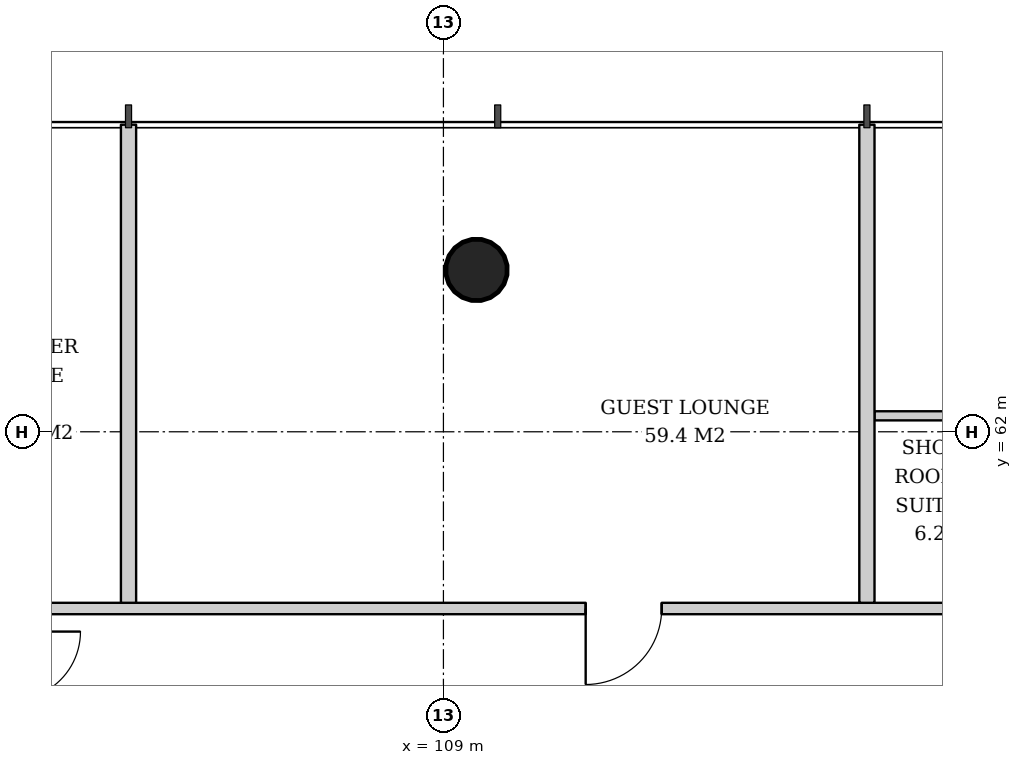
"""IFC4 building model, lengths in metres.
Left out: names, types, materials, properties, quantities, classifications, styles, units other than length and angle.
Written with IfcOpenShell. Run it as: python <this file> out.ifc"""

import sys

from ifc_helpers import new_model, si_unit, direction, frame, frame_2d, origin, origin_2d, place, context, subcontext, project, spatial, rectangle, hollow_circle, extrude, element, fill, save


model = new_model("IFC4")
c1 = context("Model", 3, precision=1e-05, world=origin(), true_north=direction((0.0, 1.0)))
c2 = subcontext(c1, "Body", "Model", "MODEL_VIEW")
j1 = project(units=[si_unit("LENGTHUNIT", "METRE"), si_unit("PLANEANGLEUNIT", "RADIAN")], contexts=[c1])
p1 = place(None, origin())
s1 = spatial("IfcSite", under=j1, at=p1, CompositionType="ELEMENT")
p2 = place(p1, origin())
s2 = spatial("IfcBuilding", under=s1, at=p2, CompositionType="ELEMENT")
p3 = place(p2, frame((0.0, 0.0, 40.0)))
s3 = spatial("IfcBuildingStorey", under=s2, at=p3, CompositionType="ELEMENT", Elevation=40.0)
p4 = place(p3, frame((109.409, 64.181, 0.0), z_axis=(0.021561848751, -0.043059525333, 0.998839808957), x_axis=(0.894160516368, 0.44774654769, 0.0)))
e1 = element("IfcColumn", 1, at=p4, inside=s3, PredefinedType="COLUMN", context=c2, shape_type="SweptSolid", body=[
    extrude(hollow_circle(Radius=0.406, WallThickness=0.03, at=origin_2d()), origin(), (0.0, 0.0, 1.0), 3.804),
])
p5 = place(p3, frame((117.091, 62.21, 0.0), z_axis=(0.0, 0.0, 1.0), x_axis=(-1.0, 0.0, 0.0)))
e2 = element("IfcWall", 2, at=p5, inside=s3, PredefinedType="PARTITIONING", context=c2, shape_type="SweptSolid", body=[
    extrude(rectangle(XDim=2.42, YDim=0.12, at=frame_2d((1.21, 0.0))), origin(), (0.0, 0.0, 1.0), 2.847),
])
p6 = place(p3, frame((131.294, 59.675, 0.0), z_axis=(0.0, 0.0, 1.0), x_axis=(-1.0, 0.0, 0.0)))
e3 = element("IfcWall", 3, at=p6, inside=s3, PredefinedType="PARTITIONING", context=c2, shape_type="SweptSolid", body=[
    extrude(rectangle(XDim=28.589, YDim=0.15, at=frame_2d((14.294, 0.0))), origin(), (0.0, 0.0, 1.0), 2.8),
])
p7 = place(p6, frame((0.923, 0.0, 0.0)))
e4 = element("IfcOpeningElement", 4, at=p7, cuts=e3, PredefinedType="OPENING", context=c2, shape_type="SweptSolid", body=[
    extrude(rectangle(XDim=0.9, YDim=2.1, at=frame_2d((0.45, 1.05))), frame((0.0, 0.085, 0.0), z_axis=(0.0, -1.0, 0.0), x_axis=(1.0, 0.0, 0.0)), (0.0, 0.0, 1.0), 0.17),
])
p8 = place(p6, frame((4.902, 0.0, 0.0)))
e5 = element("IfcOpeningElement", 5, at=p8, cuts=e3, PredefinedType="OPENING", context=c2, shape_type="SweptSolid", body=[
    extrude(rectangle(XDim=0.9, YDim=2.1, at=frame_2d((0.45, 1.05))), frame((0.0, 0.085, 0.0), z_axis=(0.0, -1.0, 0.0), x_axis=(1.0, 0.0, 0.0)), (0.0, 0.0, 1.0), 0.17),
])
p9 = place(p6, frame((13.073, 0.0, 0.0)))
e6 = element("IfcOpeningElement", 6, at=p9, cuts=e3, PredefinedType="OPENING", context=c2, shape_type="SweptSolid", body=[
    extrude(rectangle(XDim=0.9, YDim=2.1, at=frame_2d((0.45, 1.05))), frame((0.0, 0.085, 0.0), z_axis=(0.0, -1.0, 0.0), x_axis=(1.0, 0.0, 0.0)), (0.0, 0.0, 1.0), 0.17),
])
p10 = place(p6, frame((19.423, 0.0, 0.0)))
e7 = element("IfcOpeningElement", 7, at=p10, cuts=e3, PredefinedType="OPENING", context=c2, shape_type="SweptSolid", body=[
    extrude(rectangle(XDim=1.0, YDim=2.1, at=frame_2d((0.5, 1.05))), frame((0.0, 0.085, 0.0), z_axis=(0.0, -1.0, 0.0), x_axis=(1.0, 0.0, 0.0)), (0.0, 0.0, 1.0), 0.17),
])
for number, where, z_axis, x_axis in (
    (8, (114.572, 59.75, 0.0), (0.0, 0.0, 1.0), (0.0, 1.0, 0.0)),
    (9, (104.857, 59.75, 0.0), (0.0, 0.0, 1.0), (0.0, 1.0, 0.0)),
):
    element("IfcWall", number, at=place(p3, frame(where, z_axis=z_axis, x_axis=x_axis)), inside=s3, PredefinedType="PARTITIONING", context=c2, shape_type="SweptSolid", body=[
        extrude(rectangle(XDim=6.29, YDim=0.2, at=frame_2d((3.145, 0.0))), origin(), (0.0, 0.0, 1.0), 3.05),
    ])
p11 = place(p10, origin())
e10 = element("IfcDoor", 10, at=p11, inside=s3, OperationType="SINGLE_SWING_RIGHT", PredefinedType="DOOR", context=c2, shape_type="SweptSolid", body=[
    extrude(rectangle(XDim=1.0, YDim=2.1, at=frame_2d((0.5, 1.05))), frame((0.0, 0.025, 0.0), z_axis=(0.0, -1.0, 0.0), x_axis=(1.0, 0.0, 0.0)), (0.0, 0.0, 1.0), 0.05),
])
fill(e7, e10)
save(model, sys.argv[1])
